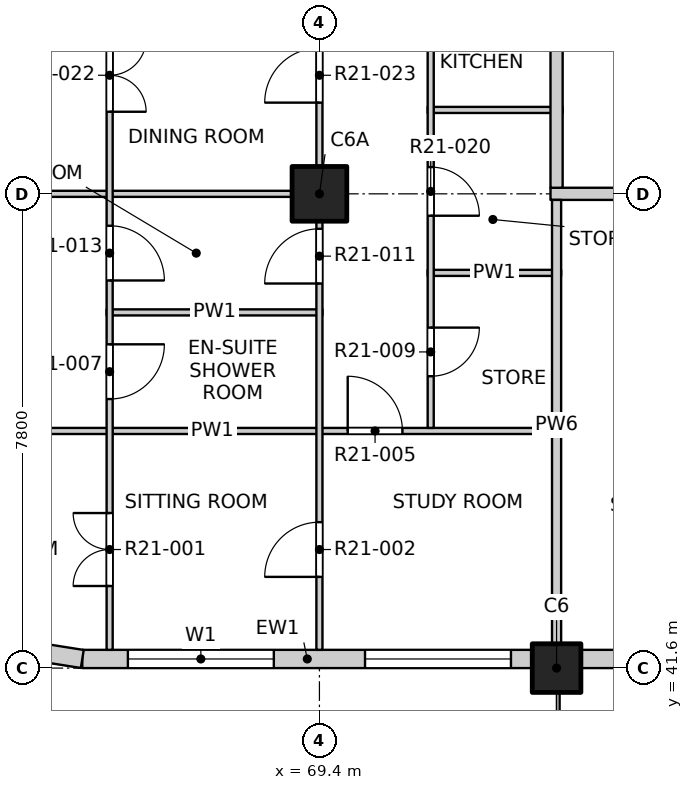
"""IFC4 building model, lengths in metres.
Left out: names, types, materials, properties, quantities, classifications, styles, units other than length and angle.
Written with IfcOpenShell. Run it as: python <this file> out.ifc"""

import sys

from ifc_helpers import new_model, si_unit, direction, frame, frame_2d, origin, origin_2d, place, context, subcontext, project, spatial, rectangle, extrude, element, fill, save


model = new_model("IFC4")
c1 = context("Model", 3, precision=1e-05, world=origin(), true_north=direction((0.0, 1.0)))
c2 = subcontext(c1, "Body", "Model", "MODEL_VIEW")
j1 = project(units=[si_unit("LENGTHUNIT", "METRE"), si_unit("PLANEANGLEUNIT", "RADIAN")], contexts=[c1])
p1 = place(None, origin())
s1 = spatial("IfcSite", under=j1, at=p1, CompositionType="ELEMENT")
p2 = place(p1, origin())
s2 = spatial("IfcBuilding", under=s1, at=p2, CompositionType="ELEMENT")
p3 = place(p2, frame((0.0, 0.0, 221.1)))
s3 = spatial("IfcBuildingStorey", under=s2, at=p3, CompositionType="ELEMENT", Elevation=221.1)
p4 = place(p3, frame((73.3, 41.6, -0.25), z_axis=(0.0, 0.0, 1.0), x_axis=(1.0, 0.0, 0.0)))
e1 = element("IfcColumn", 1, at=p4, inside=s3, PredefinedType="COLUMN", context=c2, shape_type="SweptSolid", body=[
    extrude(rectangle(XDim=0.8, YDim=0.8, at=origin_2d()), origin(), (0.0, 0.0, 1.0), 3.4),
])
p5 = place(p3, frame((69.4, 49.4, -0.25), z_axis=(0.0, 0.0, 1.0), x_axis=(1.0, 0.0, 0.0)))
e2 = element("IfcColumn", 2, at=p5, inside=s3, PredefinedType="COLUMN", context=c2, shape_type="SweptSolid", body=[
    extrude(rectangle(XDim=0.9, YDim=0.9, at=origin_2d()), origin(), (0.0, 0.0, 1.0), 3.4),
])
p6 = place(p3, frame((65.5, 41.75, 0.0), z_axis=(0.0, 0.0, 1.0), x_axis=(1.0, 0.0, 0.0)))
e3 = element("IfcWall", 3, at=p6, inside=s3, PredefinedType="SOLIDWALL", context=c2, shape_type="SweptSolid", body=[
    extrude(rectangle(XDim=7.4, YDim=0.3, at=frame_2d((3.7, 0.0))), origin(), (0.0, 0.0, 1.0), 2.7),
])
p7 = place(p6, frame((0.75, 0.0, 0.9)))
e4 = element("IfcOpeningElement", 4, at=p7, cuts=e3, PredefinedType="OPENING", context=c2, shape_type="SweptSolid", body=[
    extrude(rectangle(XDim=2.4, YDim=1.8, at=frame_2d((1.2, 0.9))), frame((0.0, 0.16, 0.0), z_axis=(0.0, -1.0, 0.0), x_axis=(1.0, 0.0, 0.0)), (0.0, 0.0, 1.0), 0.32),
])
p8 = place(p6, frame((4.65, 0.0, 0.9)))
e5 = element("IfcOpeningElement", 5, at=p8, cuts=e3, PredefinedType="OPENING", context=c2, shape_type="SweptSolid", body=[
    extrude(rectangle(XDim=2.4, YDim=1.8, at=frame_2d((1.2, 0.9))), frame((0.0, 0.16, 0.0), z_axis=(0.0, -1.0, 0.0), x_axis=(1.0, 0.0, 0.0)), (0.0, 0.0, 1.0), 0.32),
])
p9 = place(p3, frame((73.7, 41.75, 0.0), z_axis=(0.0, 0.0, 1.0), x_axis=(1.0, 0.0, 0.0)))
e6 = element("IfcWall", 6, at=p9, inside=s3, PredefinedType="SOLIDWALL", context=c2, shape_type="SweptSolid", body=[
    extrude(rectangle(XDim=7.0, YDim=0.3, at=frame_2d((3.5, 0.0))), origin(), (0.0, 0.0, 1.0), 2.7),
])
p10 = place(p9, frame((0.65, 0.0, 0.0)))
e7 = element("IfcOpeningElement", 7, at=p10, cuts=e6, PredefinedType="OPENING", context=c2, shape_type="SweptSolid", body=[
    extrude(rectangle(XDim=1.8, YDim=2.4, at=frame_2d((0.9, 1.2))), frame((0.0, 0.16, 0.0), z_axis=(0.0, -1.0, 0.0), x_axis=(1.0, 0.0, 0.0)), (0.0, 0.0, 1.0), 0.32),
])
p11 = place(p9, frame((4.25, 0.0, 0.9)))
e8 = element("IfcOpeningElement", 8, at=p11, cuts=e6, PredefinedType="OPENING", context=c2, shape_type="SweptSolid", body=[
    extrude(rectangle(XDim=2.4, YDim=1.8, at=frame_2d((1.2, 0.9))), frame((0.0, 0.16, 0.0), z_axis=(0.0, -1.0, 0.0), x_axis=(1.0, 0.0, 0.0)), (0.0, 0.0, 1.0), 0.32),
])
p12 = place(p3, frame((64.341, 41.934, 0.0), z_axis=(0.0, 0.0, 1.0), x_axis=(0.987678452879, -0.156496880861, 0.0)))
e9 = element("IfcWall", 9, at=p12, inside=s3, PredefinedType="SOLIDWALL", context=c2, shape_type="SweptSolid", body=[
    extrude(rectangle(XDim=1.173, YDim=0.3, at=frame_2d((0.586, 0.0))), origin(), (0.0, 0.0, 1.0), 2.7),
])
p13 = place(p3, frame((61.9, 45.5, 0.0), z_axis=(0.0, 0.0, 1.0), x_axis=(1.0, 0.0, 0.0)))
e10 = element("IfcWall", 10, at=p13, inside=s3, PredefinedType="PARTITIONING", context=c2, shape_type="SweptSolid", body=[
    extrude(rectangle(XDim=11.475, YDim=0.1, at=frame_2d((5.737, 0.0))), origin(), (0.0, 0.0, 1.0), 3.15),
])
p14 = place(p13, frame((7.965, 0.0, 0.0)))
e11 = element("IfcOpeningElement", 11, at=p14, cuts=e10, PredefinedType="OPENING", context=c2, shape_type="SweptSolid", body=[
    extrude(rectangle(XDim=0.9, YDim=2.1, at=frame_2d((0.45, 1.05))), frame((0.0, 0.06, 0.0), z_axis=(0.0, -1.0, 0.0), x_axis=(1.0, 0.0, 0.0)), (0.0, 0.0, 1.0), 0.12),
])
p15 = place(p3, frame((65.9, 47.45, 0.0), z_axis=(0.0, 0.0, 1.0), x_axis=(1.0, 0.0, 0.0)))
e12 = element("IfcWall", 12, at=p15, inside=s3, PredefinedType="PARTITIONING", context=c2, shape_type="SweptSolid", body=[
    extrude(rectangle(XDim=3.55, YDim=0.1, at=frame_2d((1.775, 0.0))), origin(), (0.0, 0.0, 1.0), 3.15),
])
p16 = place(p3, frame((71.18, 48.1, 0.0), z_axis=(0.0, 0.0, 1.0), x_axis=(1.0, 0.0, 0.0)))
e13 = element("IfcWall", 13, at=p16, inside=s3, PredefinedType="PARTITIONING", context=c2, shape_type="SweptSolid", body=[
    extrude(rectangle(XDim=2.195, YDim=0.1, at=frame_2d((1.097, 0.0))), origin(), (0.0, 0.0, 1.0), 3.15),
])
p17 = place(p3, frame((61.9, 49.4, 0.0), z_axis=(0.0, 0.0, 1.0), x_axis=(1.0, 0.0, 0.0)))
e14 = element("IfcWall", 14, at=p17, inside=s3, PredefinedType="PARTITIONING", context=c2, shape_type="SweptSolid", body=[
    extrude(rectangle(XDim=7.55, YDim=0.1, at=frame_2d((3.775, 0.0))), origin(), (0.0, 0.0, 1.0), 3.15),
])
p18 = place(p3, frame((73.2, 49.4, 0.0), z_axis=(0.0, 0.0, 1.0), x_axis=(1.0, 0.0, 0.0)))
e15 = element("IfcWall", 15, at=p18, inside=s3, PredefinedType="PARTITIONING", context=c2, shape_type="SweptSolid", body=[
    extrude(rectangle(XDim=23.6, YDim=0.2, at=frame_2d((11.8, 0.0))), origin(), (0.0, 0.0, 1.0), 3.15),
])
p19 = place(p18, frame((1.6, 0.0, 0.0)))
e16 = element("IfcOpeningElement", 16, at=p19, cuts=e15, PredefinedType="OPENING", context=c2, shape_type="SweptSolid", body=[
    extrude(rectangle(XDim=0.9, YDim=2.1, at=frame_2d((0.45, 1.05))), frame((0.0, 0.11, 0.0), z_axis=(0.0, -1.0, 0.0), x_axis=(1.0, 0.0, 0.0)), (0.0, 0.0, 1.0), 0.22),
])
p20 = place(p18, frame((7.3, 0.0, 0.0)))
e17 = element("IfcOpeningElement", 17, at=p20, cuts=e15, PredefinedType="OPENING", context=c2, shape_type="SweptSolid", body=[
    extrude(rectangle(XDim=1.2, YDim=2.1, at=frame_2d((0.6, 1.05))), frame((0.0, 0.11, 0.0), z_axis=(0.0, -1.0, 0.0), x_axis=(1.0, 0.0, 0.0)), (0.0, 0.0, 1.0), 0.22),
])
p21 = place(p18, frame((13.3, 0.0, 0.0)))
e18 = element("IfcOpeningElement", 18, at=p21, cuts=e15, PredefinedType="OPENING", context=c2, shape_type="SweptSolid", body=[
    extrude(rectangle(XDim=0.9, YDim=2.1, at=frame_2d((0.45, 1.05))), frame((0.0, 0.11, 0.0), z_axis=(0.0, -1.0, 0.0), x_axis=(1.0, 0.0, 0.0)), (0.0, 0.0, 1.0), 0.22),
])
p22 = place(p18, frame((20.175, 0.0, 0.0)))
e19 = element("IfcOpeningElement", 19, at=p22, cuts=e15, PredefinedType="OPENING", context=c2, shape_type="SweptSolid", body=[
    extrude(rectangle(XDim=1.2, YDim=2.1, at=frame_2d((0.6, 1.05))), frame((0.0, 0.11, 0.0), z_axis=(0.0, -1.0, 0.0), x_axis=(1.0, 0.0, 0.0)), (0.0, 0.0, 1.0), 0.22),
])
p23 = place(p3, frame((71.18, 50.78, 0.0), z_axis=(0.0, 0.0, 1.0), x_axis=(1.0, 0.0, 0.0)))
e20 = element("IfcWall", 20, at=p23, inside=s3, PredefinedType="PARTITIONING", context=c2, shape_type="SweptSolid", body=[
    extrude(rectangle(XDim=2.22, YDim=0.1, at=frame_2d((1.11, 0.0))), origin(), (0.0, 0.0, 1.0), 3.15),
])
p24 = place(p3, frame((65.95, 41.9, 0.0), z_axis=(0.0, 0.0, 1.0), x_axis=(0.0, 1.0, 0.0)))
e21 = element("IfcWall", 21, at=p24, inside=s3, PredefinedType="PARTITIONING", context=c2, shape_type="SweptSolid", body=[
    extrude(rectangle(XDim=19.1, YDim=0.1, at=frame_2d((9.55, 0.0))), origin(), (0.0, 0.0, 1.0), 3.15),
])
p25 = place(p24, frame((1.05, 0.0, 0.0)))
e22 = element("IfcOpeningElement", 22, at=p25, cuts=e21, PredefinedType="OPENING", context=c2, shape_type="SweptSolid", body=[
    extrude(rectangle(XDim=1.2, YDim=2.1, at=frame_2d((0.6, 1.05))), frame((0.0, 0.06, 0.0), z_axis=(0.0, -1.0, 0.0), x_axis=(1.0, 0.0, 0.0)), (0.0, 0.0, 1.0), 0.12),
])
p26 = place(p24, frame((4.125, 0.0, 0.0)))
e23 = element("IfcOpeningElement", 23, at=p26, cuts=e21, PredefinedType="OPENING", context=c2, shape_type="SweptSolid", body=[
    extrude(rectangle(XDim=0.9, YDim=2.1, at=frame_2d((0.45, 1.05))), frame((0.0, 0.06, 0.0), z_axis=(0.0, -1.0, 0.0), x_axis=(1.0, 0.0, 0.0)), (0.0, 0.0, 1.0), 0.12),
])
p27 = place(p24, frame((6.075, 0.0, 0.0)))
e24 = element("IfcOpeningElement", 24, at=p27, cuts=e21, PredefinedType="OPENING", context=c2, shape_type="SweptSolid", body=[
    extrude(rectangle(XDim=0.9, YDim=2.1, at=frame_2d((0.45, 1.05))), frame((0.0, 0.06, 0.0), z_axis=(0.0, -1.0, 0.0), x_axis=(1.0, 0.0, 0.0)), (0.0, 0.0, 1.0), 0.12),
])
p28 = place(p24, frame((8.85, 0.0, 0.0)))
e25 = element("IfcOpeningElement", 25, at=p28, cuts=e21, PredefinedType="OPENING", context=c2, shape_type="SweptSolid", body=[
    extrude(rectangle(XDim=1.2, YDim=2.1, at=frame_2d((0.6, 1.05))), frame((0.0, 0.06, 0.0), z_axis=(0.0, -1.0, 0.0), x_axis=(1.0, 0.0, 0.0)), (0.0, 0.0, 1.0), 0.12),
])
p29 = place(p24, frame((12.75, 0.0, 0.0)))
e26 = element("IfcOpeningElement", 26, at=p29, cuts=e21, PredefinedType="OPENING", context=c2, shape_type="SweptSolid", body=[
    extrude(rectangle(XDim=1.2, YDim=2.1, at=frame_2d((0.6, 1.05))), frame((0.0, 0.06, 0.0), z_axis=(0.0, -1.0, 0.0), x_axis=(1.0, 0.0, 0.0)), (0.0, 0.0, 1.0), 0.12),
])
p30 = place(p24, frame((15.825, 0.0, 0.0)))
e27 = element("IfcOpeningElement", 27, at=p30, cuts=e21, PredefinedType="OPENING", context=c2, shape_type="SweptSolid", body=[
    extrude(rectangle(XDim=0.9, YDim=2.1, at=frame_2d((0.45, 1.05))), frame((0.0, 0.06, 0.0), z_axis=(0.0, -1.0, 0.0), x_axis=(1.0, 0.0, 0.0)), (0.0, 0.0, 1.0), 0.12),
])
p31 = place(p24, frame((17.775, 0.0, 0.0)))
e28 = element("IfcOpeningElement", 28, at=p31, cuts=e21, PredefinedType="OPENING", context=c2, shape_type="SweptSolid", body=[
    extrude(rectangle(XDim=0.9, YDim=2.1, at=frame_2d((0.45, 1.05))), frame((0.0, 0.06, 0.0), z_axis=(0.0, -1.0, 0.0), x_axis=(1.0, 0.0, 0.0)), (0.0, 0.0, 1.0), 0.12),
])
p32 = place(p3, frame((69.4, 41.9, 0.0), z_axis=(0.0, 0.0, 1.0), x_axis=(0.0, 1.0, 0.0)))
e29 = element("IfcWall", 29, at=p32, inside=s3, PredefinedType="PARTITIONING", context=c2, shape_type="SweptSolid", body=[
    extrude(rectangle(XDim=46.2, YDim=0.1, at=frame_2d((23.1, 0.0))), origin(), (0.0, 0.0, 1.0), 3.15),
])
p33 = place(p32, frame((1.2, 0.0, 0.0)))
e30 = element("IfcOpeningElement", 30, at=p33, cuts=e29, PredefinedType="OPENING", context=c2, shape_type="SweptSolid", body=[
    extrude(rectangle(XDim=0.9, YDim=2.1, at=frame_2d((0.45, 1.05))), frame((0.0, 0.06, 0.0), z_axis=(0.0, -1.0, 0.0), x_axis=(1.0, 0.0, 0.0)), (0.0, 0.0, 1.0), 0.12),
])
p34 = place(p32, frame((6.025, 0.0, 0.0)))
e31 = element("IfcOpeningElement", 31, at=p34, cuts=e29, PredefinedType="OPENING", context=c2, shape_type="SweptSolid", body=[
    extrude(rectangle(XDim=0.9, YDim=2.1, at=frame_2d((0.45, 1.05))), frame((0.0, 0.06, 0.0), z_axis=(0.0, -1.0, 0.0), x_axis=(1.0, 0.0, 0.0)), (0.0, 0.0, 1.0), 0.12),
])
p35 = place(p32, frame((9.0, 0.0, 0.0)))
e32 = element("IfcOpeningElement", 32, at=p35, cuts=e29, PredefinedType="OPENING", context=c2, shape_type="SweptSolid", body=[
    extrude(rectangle(XDim=0.9, YDim=2.1, at=frame_2d((0.45, 1.05))), frame((0.0, 0.06, 0.0), z_axis=(0.0, -1.0, 0.0), x_axis=(1.0, 0.0, 0.0)), (0.0, 0.0, 1.0), 0.12),
])
p36 = place(p32, frame((12.9, 0.0, 0.0)))
e33 = element("IfcOpeningElement", 33, at=p36, cuts=e29, PredefinedType="OPENING", context=c2, shape_type="SweptSolid", body=[
    extrude(rectangle(XDim=0.9, YDim=2.1, at=frame_2d((0.45, 1.05))), frame((0.0, 0.06, 0.0), z_axis=(0.0, -1.0, 0.0), x_axis=(1.0, 0.0, 0.0)), (0.0, 0.0, 1.0), 0.12),
])
p37 = place(p32, frame((17.775, 0.0, 0.0)))
e34 = element("IfcOpeningElement", 34, at=p37, cuts=e29, PredefinedType="OPENING", context=c2, shape_type="SweptSolid", body=[
    extrude(rectangle(XDim=0.9, YDim=2.1, at=frame_2d((0.45, 1.05))), frame((0.0, 0.06, 0.0), z_axis=(0.0, -1.0, 0.0), x_axis=(1.0, 0.0, 0.0)), (0.0, 0.0, 1.0), 0.12),
])
p38 = place(p32, frame((20.7, 0.0, 0.0)))
e35 = element("IfcOpeningElement", 35, at=p38, cuts=e29, PredefinedType="OPENING", context=c2, shape_type="SweptSolid", body=[
    extrude(rectangle(XDim=0.9, YDim=2.1, at=frame_2d((0.45, 1.05))), frame((0.0, 0.06, 0.0), z_axis=(0.0, -1.0, 0.0), x_axis=(1.0, 0.0, 0.0)), (0.0, 0.0, 1.0), 0.12),
])
p39 = place(p32, frame((24.6, 0.0, 0.0)))
e36 = element("IfcOpeningElement", 36, at=p39, cuts=e29, PredefinedType="OPENING", context=c2, shape_type="SweptSolid", body=[
    extrude(rectangle(XDim=0.9, YDim=2.1, at=frame_2d((0.45, 1.05))), frame((0.0, 0.06, 0.0), z_axis=(0.0, -1.0, 0.0), x_axis=(1.0, 0.0, 0.0)), (0.0, 0.0, 1.0), 0.12),
])
p40 = place(p32, frame((29.425, 0.0, 0.0)))
e37 = element("IfcOpeningElement", 37, at=p40, cuts=e29, PredefinedType="OPENING", context=c2, shape_type="SweptSolid", body=[
    extrude(rectangle(XDim=0.9, YDim=2.1, at=frame_2d((0.45, 1.05))), frame((0.0, 0.06, 0.0), z_axis=(0.0, -1.0, 0.0), x_axis=(1.0, 0.0, 0.0)), (0.0, 0.0, 1.0), 0.12),
])
p41 = place(p32, frame((33.375, 0.0, 0.0)))
e38 = element("IfcOpeningElement", 38, at=p41, cuts=e29, PredefinedType="OPENING", context=c2, shape_type="SweptSolid", body=[
    extrude(rectangle(XDim=0.9, YDim=2.1, at=frame_2d((0.45, 1.05))), frame((0.0, 0.06, 0.0), z_axis=(0.0, -1.0, 0.0), x_axis=(1.0, 0.0, 0.0)), (0.0, 0.0, 1.0), 0.12),
])
p42 = place(p32, frame((36.3, 0.0, 0.0)))
e39 = element("IfcOpeningElement", 39, at=p42, cuts=e29, PredefinedType="OPENING", context=c2, shape_type="SweptSolid", body=[
    extrude(rectangle(XDim=0.9, YDim=2.1, at=frame_2d((0.45, 1.05))), frame((0.0, 0.06, 0.0), z_axis=(0.0, -1.0, 0.0), x_axis=(1.0, 0.0, 0.0)), (0.0, 0.0, 1.0), 0.12),
])
p43 = place(p32, frame((41.175, 0.0, 0.0)))
e40 = element("IfcOpeningElement", 40, at=p43, cuts=e29, PredefinedType="OPENING", context=c2, shape_type="SweptSolid", body=[
    extrude(rectangle(XDim=0.9, YDim=2.1, at=frame_2d((0.45, 1.05))), frame((0.0, 0.06, 0.0), z_axis=(0.0, -1.0, 0.0), x_axis=(1.0, 0.0, 0.0)), (0.0, 0.0, 1.0), 0.12),
])
p44 = place(p32, frame((44.1, 0.0, 0.0)))
e41 = element("IfcOpeningElement", 41, at=p44, cuts=e29, PredefinedType="OPENING", context=c2, shape_type="SweptSolid", body=[
    extrude(rectangle(XDim=0.9, YDim=2.1, at=frame_2d((0.45, 1.05))), frame((0.0, 0.06, 0.0), z_axis=(0.0, -1.0, 0.0), x_axis=(1.0, 0.0, 0.0)), (0.0, 0.0, 1.0), 0.12),
])
p45 = place(p3, frame((71.23, 45.55, 0.0), z_axis=(0.0, 0.0, 1.0), x_axis=(0.0, 1.0, 0.0)))
e42 = element("IfcWall", 42, at=p45, inside=s3, PredefinedType="PARTITIONING", context=c2, shape_type="SweptSolid", body=[
    extrude(rectangle(XDim=8.4, YDim=0.1, at=frame_2d((4.2, 0.0))), origin(), (0.0, 0.0, 1.0), 3.15),
])
p46 = place(p45, frame((0.85, 0.0, 0.0)))
e43 = element("IfcOpeningElement", 43, at=p46, cuts=e42, PredefinedType="OPENING", context=c2, shape_type="SweptSolid", body=[
    extrude(rectangle(XDim=0.8, YDim=2.1, at=frame_2d((0.4, 1.05))), frame((0.0, 0.06, 0.0), z_axis=(0.0, -1.0, 0.0), x_axis=(1.0, 0.0, 0.0)), (0.0, 0.0, 1.0), 0.12),
])
p47 = place(p45, frame((3.49, 0.0, 0.0)))
e44 = element("IfcOpeningElement", 44, at=p47, cuts=e42, PredefinedType="OPENING", context=c2, shape_type="SweptSolid", body=[
    extrude(rectangle(XDim=0.8, YDim=2.1, at=frame_2d((0.4, 1.05))), frame((0.0, 0.06, 0.0), z_axis=(0.0, -1.0, 0.0), x_axis=(1.0, 0.0, 0.0)), (0.0, 0.0, 1.0), 0.12),
])
p48 = place(p45, frame((6.39, 0.0, 0.0)))
e45 = element("IfcOpeningElement", 45, at=p48, cuts=e42, PredefinedType="OPENING", context=c2, shape_type="SweptSolid", body=[
    extrude(rectangle(XDim=0.9, YDim=2.1, at=frame_2d((0.45, 1.05))), frame((0.0, 0.06, 0.0), z_axis=(0.0, -1.0, 0.0), x_axis=(1.0, 0.0, 0.0)), (0.0, 0.0, 1.0), 0.12),
])
p49 = place(p3, frame((73.3, 41.9, 0.0), z_axis=(0.0, 0.0, 1.0), x_axis=(0.0, 1.0, 0.0)))
e46 = element("IfcWall", 46, at=p49, inside=s3, PredefinedType="PARTITIONING", context=c2, shape_type="SweptSolid", body=[
    extrude(rectangle(XDim=7.4, YDim=0.15, at=frame_2d((3.7, 0.0))), origin(), (0.0, 0.0, 1.0), 3.15),
])
p50 = place(p3, frame((73.3, 49.5, 0.0), z_axis=(0.0, 0.0, 1.0), x_axis=(0.0, 1.0, 0.0)))
e47 = element("IfcWall", 47, at=p50, inside=s3, PredefinedType="PARTITIONING", context=c2, shape_type="SweptSolid", body=[
    extrude(rectangle(XDim=34.9, YDim=0.2, at=frame_2d((17.45, 0.0))), origin(), (0.0, 0.0, 1.0), 3.15),
])
p51 = place(p50, frame((3.325, 0.0, 0.0)))
e48 = element("IfcOpeningElement", 48, at=p51, cuts=e47, PredefinedType="OPENING", context=c2, shape_type="SweptSolid", body=[
    extrude(rectangle(XDim=1.0, YDim=2.1, at=frame_2d((0.5, 1.05))), frame((0.0, 0.11, 0.0), z_axis=(0.0, -1.0, 0.0), x_axis=(1.0, 0.0, 0.0)), (0.0, 0.0, 1.0), 0.22),
])
p52 = place(p50, frame((18.875, 0.0, 0.0)))
e49 = element("IfcOpeningElement", 49, at=p52, cuts=e47, PredefinedType="OPENING", context=c2, shape_type="SweptSolid", body=[
    extrude(rectangle(XDim=1.0, YDim=2.1, at=frame_2d((0.5, 1.05))), frame((0.0, 0.11, 0.0), z_axis=(0.0, -1.0, 0.0), x_axis=(1.0, 0.0, 0.0)), (0.0, 0.0, 1.0), 0.22),
])
p53 = place(p50, frame((29.325, 0.0, 0.0)))
e50 = element("IfcOpeningElement", 50, at=p53, cuts=e47, PredefinedType="OPENING", context=c2, shape_type="SweptSolid", body=[
    extrude(rectangle(XDim=1.0, YDim=2.1, at=frame_2d((0.5, 1.05))), frame((0.0, 0.11, 0.0), z_axis=(0.0, -1.0, 0.0), x_axis=(1.0, 0.0, 0.0)), (0.0, 0.0, 1.0), 0.22),
])
p54 = place(p7, origin())
e51 = element("IfcWindow", 51, at=p54, inside=s3, PartitioningType="DOUBLE_PANEL_VERTICAL", PredefinedType="WINDOW", context=c2, shape_type="SweptSolid", body=[
    extrude(rectangle(XDim=2.4, YDim=1.8, at=frame_2d((1.2, 0.9))), frame((0.0, 0.03, 0.0), z_axis=(0.0, -1.0, 0.0), x_axis=(1.0, 0.0, 0.0)), (0.0, 0.0, 1.0), 0.06),
])
fill(e4, e51)
p55 = place(p8, origin())
e52 = element("IfcWindow", 52, at=p55, inside=s3, PartitioningType="DOUBLE_PANEL_VERTICAL", PredefinedType="WINDOW", context=c2, shape_type="SweptSolid", body=[
    extrude(rectangle(XDim=2.4, YDim=1.8, at=frame_2d((1.2, 0.9))), frame((0.0, 0.03, 0.0), z_axis=(0.0, -1.0, 0.0), x_axis=(1.0, 0.0, 0.0)), (0.0, 0.0, 1.0), 0.06),
])
fill(e5, e52)
p56 = place(p25, origin())
e53 = element("IfcDoor", 53, at=p56, inside=s3, OperationType="DOUBLE_DOOR_SINGLE_SWING", PredefinedType="DOOR", context=c2, shape_type="SweptSolid", body=[
    extrude(rectangle(XDim=1.2, YDim=2.1, at=frame_2d((0.6, 1.05))), frame((0.0, 0.025, 0.0), z_axis=(0.0, -1.0, 0.0), x_axis=(1.0, 0.0, 0.0)), (0.0, 0.0, 1.0), 0.05),
])
fill(e22, e53)
p57 = place(p33, origin())
e54 = element("IfcDoor", 54, at=p57, inside=s3, OperationType="SINGLE_SWING_LEFT", PredefinedType="DOOR", context=c2, shape_type="SweptSolid", body=[
    extrude(rectangle(XDim=0.9, YDim=2.1, at=frame_2d((0.45, 1.05))), frame((0.0, 0.025, 0.0), z_axis=(0.0, -1.0, 0.0), x_axis=(1.0, 0.0, 0.0)), (0.0, 0.0, 1.0), 0.05),
])
fill(e30, e54)
p58 = place(p14, origin())
e55 = element("IfcDoor", 55, at=p58, inside=s3, OperationType="SINGLE_SWING_LEFT", PredefinedType="DOOR", context=c2, shape_type="SweptSolid", body=[
    extrude(rectangle(XDim=0.9, YDim=2.1, at=frame_2d((0.45, 1.05))), frame((0.0, 0.025, 0.0), z_axis=(0.0, -1.0, 0.0), x_axis=(1.0, 0.0, 0.0)), (0.0, 0.0, 1.0), 0.05),
])
fill(e11, e55)
p59 = place(p26, origin())
e56 = element("IfcDoor", 56, at=p59, inside=s3, OperationType="SINGLE_SWING_LEFT", PredefinedType="DOOR", context=c2, shape_type="SweptSolid", body=[
    extrude(rectangle(XDim=0.9, YDim=2.1, at=frame_2d((0.45, 1.05))), frame((0.0, 0.025, 0.0), z_axis=(0.0, -1.0, 0.0), x_axis=(1.0, 0.0, 0.0)), (0.0, 0.0, 1.0), 0.05),
])
fill(e23, e56)
p60 = place(p46, origin())
e57 = element("IfcDoor", 57, at=p60, inside=s3, OperationType="SINGLE_SWING_LEFT", PredefinedType="DOOR", context=c2, shape_type="SweptSolid", body=[
    extrude(rectangle(XDim=0.8, YDim=2.1, at=frame_2d((0.4, 1.05))), frame((0.0, 0.025, 0.0), z_axis=(0.0, -1.0, 0.0), x_axis=(1.0, 0.0, 0.0)), (0.0, 0.0, 1.0), 0.05),
])
fill(e43, e57)
p61 = place(p34, origin())
e58 = element("IfcDoor", 58, at=p61, inside=s3, OperationType="SINGLE_SWING_LEFT", PredefinedType="DOOR", context=c2, shape_type="SweptSolid", body=[
    extrude(rectangle(XDim=0.9, YDim=2.1, at=frame_2d((0.45, 1.05))), frame((0.0, 0.025, 0.0), z_axis=(0.0, -1.0, 0.0), x_axis=(1.0, 0.0, 0.0)), (0.0, 0.0, 1.0), 0.05),
])
fill(e31, e58)
p62 = place(p27, origin())
e59 = element("IfcDoor", 59, at=p62, inside=s3, OperationType="SINGLE_SWING_RIGHT", PredefinedType="DOOR", context=c2, shape_type="SweptSolid", body=[
    extrude(rectangle(XDim=0.9, YDim=2.1, at=frame_2d((0.45, 1.05))), frame((0.0, 0.025, 0.0), z_axis=(0.0, -1.0, 0.0), x_axis=(1.0, 0.0, 0.0)), (0.0, 0.0, 1.0), 0.05),
])
fill(e24, e59)
p63 = place(p47, origin())
e60 = element("IfcDoor", 60, at=p63, inside=s3, OperationType="SINGLE_SWING_RIGHT", PredefinedType="DOOR", context=c2, shape_type="SweptSolid", body=[
    extrude(rectangle(XDim=0.8, YDim=2.1, at=frame_2d((0.4, 1.05))), frame((0.0, 0.025, 0.0), z_axis=(0.0, -1.0, 0.0), x_axis=(1.0, 0.0, 0.0)), (0.0, 0.0, 1.0), 0.05),
])
fill(e44, e60)
p64 = place(p28, origin())
e61 = element("IfcDoor", 61, at=p64, inside=s3, OperationType="DOUBLE_DOOR_SINGLE_SWING", PredefinedType="DOOR", context=c2, shape_type="SweptSolid", body=[
    extrude(rectangle(XDim=1.2, YDim=2.1, at=frame_2d((0.6, 1.05))), frame((0.0, 0.025, 0.0), z_axis=(0.0, -1.0, 0.0), x_axis=(1.0, 0.0, 0.0)), (0.0, 0.0, 1.0), 0.05),
])
fill(e25, e61)
p65 = place(p35, origin())
e62 = element("IfcDoor", 62, at=p65, inside=s3, OperationType="SINGLE_SWING_LEFT", PredefinedType="DOOR", context=c2, shape_type="SweptSolid", body=[
    extrude(rectangle(XDim=0.9, YDim=2.1, at=frame_2d((0.45, 1.05))), frame((0.0, 0.025, 0.0), z_axis=(0.0, -1.0, 0.0), x_axis=(1.0, 0.0, 0.0)), (0.0, 0.0, 1.0), 0.05),
])
fill(e32, e62)
save(model, sys.argv[1])
